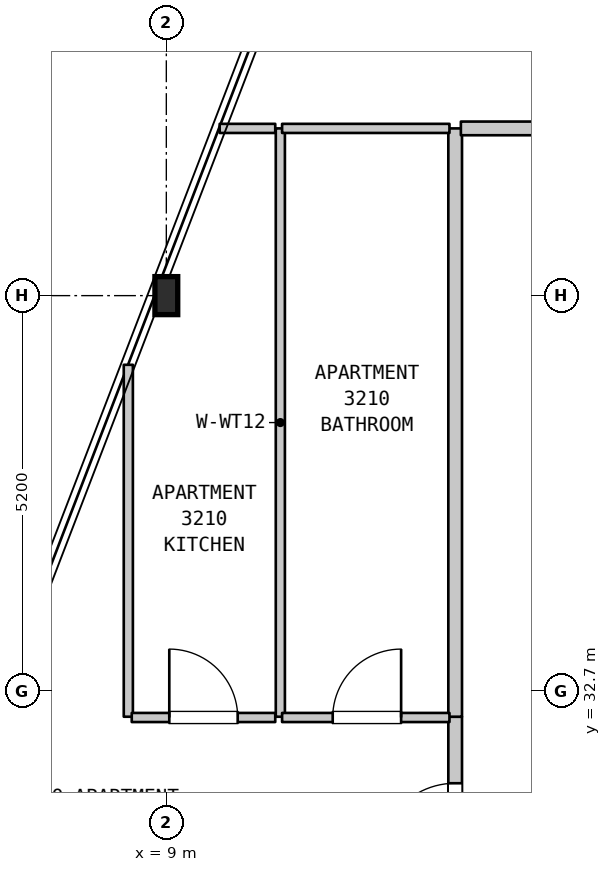
"""IFC4 building model, lengths in metres.
Left out: names, types, materials, properties, quantities, classifications, styles, units other than length and angle.
Written with IfcOpenShell. Run it as: python <this file> out.ifc"""

import sys

from ifc_helpers import new_model, si_unit, direction, frame, frame_2d, origin, origin_2d, place, context, subcontext, project, spatial, rectangle, i_section, extrude, element, fill, save


model = new_model("IFC4")
c1 = context("Model", 3, precision=1e-05, world=origin(), true_north=direction((0.0, 1.0)))
c2 = subcontext(c1, "Body", "Model", "MODEL_VIEW")
j1 = project(units=[si_unit("LENGTHUNIT", "METRE"), si_unit("PLANEANGLEUNIT", "RADIAN")], contexts=[c1])
p1 = place(None, origin())
s1 = spatial("IfcSite", under=j1, at=p1, CompositionType="ELEMENT")
p2 = place(p1, origin())
s2 = spatial("IfcBuilding", under=s1, at=p2, CompositionType="ELEMENT")
p3 = place(p2, frame((0.0, 0.0, 133.5)))
s3 = spatial("IfcBuildingStorey", under=s2, at=p3, CompositionType="ELEMENT", Elevation=133.5)
p4 = place(p3, frame((9.0, 37.9, 0.0), z_axis=(0.0, 0.0, 1.0), x_axis=(1.0, 0.0, 0.0)))
e1 = element("IfcColumn", 1, at=p4, inside=s3, PredefinedType="COLUMN", context=c2, shape_type="SweptSolid", body=[
    extrude(i_section(OverallWidth=0.3, OverallDepth=0.5, WebThickness=0.014, FlangeThickness=0.028, FilletRadius=0.027, at=origin_2d()), origin(), (0.0, 0.0, 1.0), 3.7),
])
p5 = place(p3, frame((8.5, 32.36, 0.0), z_axis=(0.0, 0.0, 1.0), x_axis=(0.0, 1.0, 0.0)))
e2 = element("IfcWall", 2, at=p5, inside=s3, PredefinedType="PARTITIONING", context=c2, shape_type="SweptSolid", body=[
    extrude(rectangle(XDim=4.63, YDim=0.12, at=frame_2d((2.315, 0.0))), origin(), (0.0, 0.0, 1.0), 3.385),
])
p6 = place(p3, frame((10.5, 32.36, 0.0), z_axis=(0.0, 0.0, 1.0), x_axis=(0.0, 1.0, 0.0)))
e3 = element("IfcWall", 3, at=p6, inside=s3, PredefinedType="PARTITIONING", context=c2, shape_type="SweptSolid", body=[
    extrude(rectangle(XDim=7.74, YDim=0.12, at=frame_2d((3.87, 0.0))), origin(), (0.0, 0.0, 1.0), 3.385),
])
p7 = place(p3, frame((12.8, 29.61, 0.0), z_axis=(0.0, 0.0, 1.0), x_axis=(0.0, 1.0, 0.0)))
e4 = element("IfcWall", 4, at=p7, inside=s3, PredefinedType="STANDARD", context=c2, shape_type="SweptSolid", body=[
    extrude(rectangle(XDim=2.75, YDim=0.18, at=frame_2d((1.375, 0.0))), origin(), (0.0, 0.0, 1.0), 3.385),
])
p8 = place(p7, frame((0.875, 0.0, 0.0)))
e5 = element("IfcOpeningElement", 5, at=p8, cuts=e4, PredefinedType="OPENING", context=c2, shape_type="SweptSolid", body=[
    extrude(rectangle(XDim=1.0, YDim=2.15, at=frame_2d((0.5, 1.075))), frame((0.0, 0.1, 0.0), z_axis=(0.0, -1.0, 0.0), x_axis=(1.0, 0.0, 0.0)), (0.0, 0.0, 1.0), 0.2),
])
p9 = place(p3, frame((12.8, 32.36, 0.0), z_axis=(0.0, 0.0, 1.0), x_axis=(0.0, 1.0, 0.0)))
e6 = element("IfcWall", 6, at=p9, inside=s3, PredefinedType="STANDARD", context=c2, shape_type="SweptSolid", body=[
    extrude(rectangle(XDim=7.74, YDim=0.18, at=frame_2d((3.87, 0.0))), origin(), (0.0, 0.0, 1.0), 3.385),
])
p10 = place(p3, frame((8.545, 32.35, 0.0), z_axis=(0.0, 0.0, 1.0), x_axis=(1.0, 0.0, 0.0)))
e7 = element("IfcWall", 7, at=p10, inside=s3, PredefinedType="PARTITIONING", context=c2, shape_type="SweptSolid", body=[
    extrude(rectangle(XDim=1.888, YDim=0.12, at=frame_2d((0.944, 0.0))), origin(), (0.0, 0.0, 1.0), 3.385),
])
p11 = place(p10, frame((0.494, 0.0, 0.0)))
e8 = element("IfcOpeningElement", 8, at=p11, cuts=e7, PredefinedType="OPENING", context=c2, shape_type="SweptSolid", body=[
    extrude(rectangle(XDim=0.9, YDim=2.15, at=frame_2d((0.45, 1.075))), frame((0.0, 0.07, 0.0), z_axis=(0.0, -1.0, 0.0), x_axis=(1.0, 0.0, 0.0)), (0.0, 0.0, 1.0), 0.14),
])
p12 = place(p3, frame((10.523, 32.35, 0.0), z_axis=(0.0, 0.0, 1.0), x_axis=(1.0, 0.0, 0.0)))
e9 = element("IfcWall", 9, at=p12, inside=s3, PredefinedType="PARTITIONING", context=c2, shape_type="SweptSolid", body=[
    extrude(rectangle(XDim=2.202, YDim=0.12, at=frame_2d((1.101, 0.0))), origin(), (0.0, 0.0, 1.0), 3.385),
])
p13 = place(p12, frame((0.666, 0.0, 0.0)))
e10 = element("IfcOpeningElement", 10, at=p13, cuts=e9, PredefinedType="OPENING", context=c2, shape_type="SweptSolid", body=[
    extrude(rectangle(XDim=0.9, YDim=2.1, at=frame_2d((0.45, 1.05))), frame((0.0, 0.07, 0.0), z_axis=(0.0, -1.0, 0.0), x_axis=(1.0, 0.0, 0.0)), (0.0, 0.0, 1.0), 0.14),
])
p14 = place(p3, frame((9.702, 40.1, 0.0), z_axis=(0.0, 0.0, 1.0), x_axis=(1.0, 0.0, 0.0)))
e11 = element("IfcWall", 11, at=p14, inside=s3, PredefinedType="PARTITIONING", context=c2, shape_type="SweptSolid", body=[
    extrude(rectangle(XDim=0.731, YDim=0.12, at=frame_2d((0.366, 0.0))), origin(), (0.0, 0.0, 1.0), 3.385),
])
p15 = place(p3, frame((10.523, 40.1, 0.0), z_axis=(0.0, 0.0, 1.0), x_axis=(1.0, 0.0, 0.0)))
e12 = element("IfcWall", 12, at=p15, inside=s3, PredefinedType="PARTITIONING", context=c2, shape_type="SweptSolid", body=[
    extrude(rectangle(XDim=2.202, YDim=0.12, at=frame_2d((1.101, 0.0))), origin(), (0.0, 0.0, 1.0), 3.385),
])
p16 = place(p3, frame((12.875, 40.1, 0.0), z_axis=(0.0, 0.0, 1.0), x_axis=(1.0, 0.0, 0.0)))
e13 = element("IfcWall", 13, at=p16, inside=s3, PredefinedType="STANDARD", context=c2, shape_type="SweptSolid", body=[
    extrude(rectangle(XDim=1.48, YDim=0.18, at=frame_2d((0.74, 0.0))), origin(), (0.0, 0.0, 1.0), 3.385),
])
p17 = place(p8, origin())
e14 = element("IfcDoor", 14, at=p17, inside=s3, OperationType="SINGLE_SWING_LEFT", PredefinedType="DOOR", context=c2, shape_type="SweptSolid", body=[
    extrude(rectangle(XDim=1.0, YDim=2.15, at=frame_2d((0.5, 1.075))), frame((0.0, 0.025, 0.0), z_axis=(0.0, -1.0, 0.0), x_axis=(1.0, 0.0, 0.0)), (0.0, 0.0, 1.0), 0.05),
])
fill(e5, e14)
p18 = place(p11, origin())
e15 = element("IfcDoor", 15, at=p18, inside=s3, OperationType="SINGLE_SWING_LEFT", PredefinedType="DOOR", context=c2, shape_type="SweptSolid", body=[
    extrude(rectangle(XDim=0.9, YDim=2.15, at=frame_2d((0.45, 1.075))), frame((0.0, 0.025, 0.0), z_axis=(0.0, -1.0, 0.0), x_axis=(1.0, 0.0, 0.0)), (0.0, 0.0, 1.0), 0.05),
])
fill(e8, e15)
p19 = place(p13, origin())
e16 = element("IfcDoor", 16, at=p19, inside=s3, OperationType="SINGLE_SWING_RIGHT", PredefinedType="DOOR", context=c2, shape_type="SweptSolid", body=[
    extrude(rectangle(XDim=0.9, YDim=2.1, at=frame_2d((0.45, 1.05))), frame((0.0, 0.025, 0.0), z_axis=(0.0, -1.0, 0.0), x_axis=(1.0, 0.0, 0.0)), (0.0, 0.0, 1.0), 0.05),
])
fill(e10, e16)
save(model, sys.argv[1])
